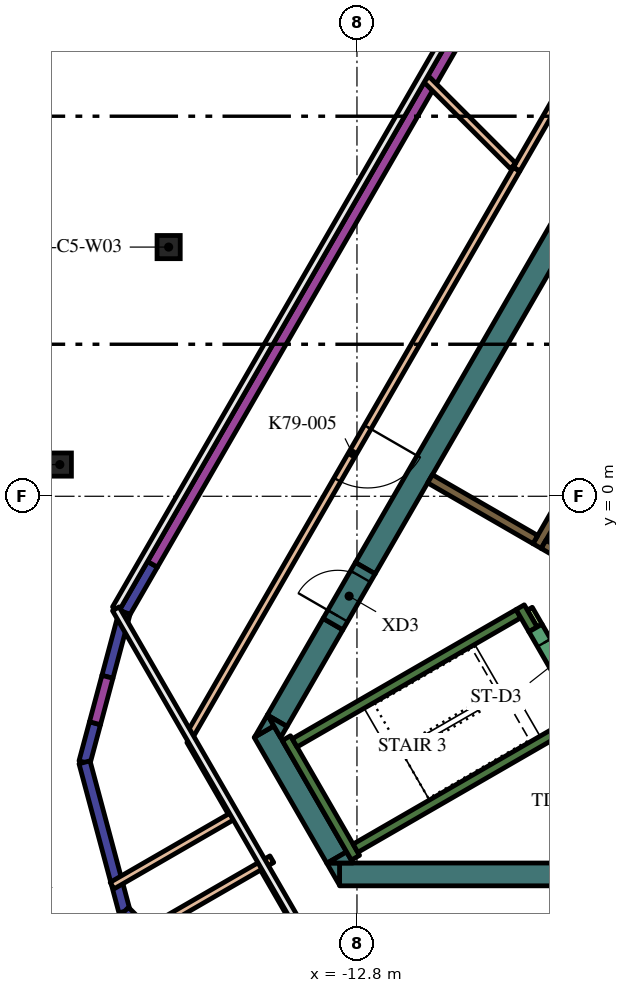
"""IFC4 building model, lengths in metres.
Left out: names, types, materials, properties, quantities, classifications, styles, units other than length and angle.
Written with IfcOpenShell. Run it as: python <this file> out.ifc"""

import sys

from ifc_helpers import new_model, si_unit, direction, frame, frame_2d, origin, origin_2d, place, context, subcontext, project, spatial, polyline, rectangle, hollow_circle, outline, extrude, element, fill, save


model = new_model("IFC4")
c1 = context("Model", 3, precision=1e-05, world=origin(), true_north=direction((0.0, 1.0)))
c2 = subcontext(c1, "Body", "Model", "MODEL_VIEW")
j1 = project(units=[si_unit("LENGTHUNIT", "METRE"), si_unit("PLANEANGLEUNIT", "RADIAN")], contexts=[c1])
p1 = place(None, origin())
s1 = spatial("IfcSite", under=j1, at=p1, CompositionType="ELEMENT")
p2 = place(p1, origin())
s2 = spatial("IfcBuilding", under=s1, at=p2, CompositionType="ELEMENT")
p3 = place(p2, frame((0.0, 0.0, 340.2)))
s3 = spatial("IfcBuildingStorey", under=s2, at=p3, CompositionType="ELEMENT", Elevation=340.2)
for number, where, z_axis, x_axis in (
    (1, (-17.756, 6.557, 0.0), (0.0, 0.0, 1.0), (1.0, 0.0, 0.0)),
    (2, (-20.619, 0.834, 0.0), (0.0, 0.0, 1.0), (1.0, 0.0, 0.0)),
):
    element("IfcColumn", number, at=place(p3, frame(where, z_axis=z_axis, x_axis=x_axis)), inside=s3, PredefinedType="COLUMN", context=c2, shape_type="SweptSolid", body=[
        extrude(hollow_circle(Radius=0.305, WallThickness=0.025, at=origin_2d()), origin(), (0.0, 0.0, 1.0), 4.2),
    ])
p4 = place(p3, frame((8.904, -9.95, 0.0), z_axis=(0.0, 0.0, 1.0), x_axis=(-1.0, 0.0, 0.0)))
e3 = element("IfcWall", 3, at=p4, inside=s3, PredefinedType="SOLIDWALL", context=c2, shape_type="SweptSolid", body=[
    extrude(rectangle(XDim=22.161, YDim=0.6, at=frame_2d((11.081, 0.0))), origin(), (0.0, 0.0, 1.0), 4.2),
])
p5 = place(p3, origin())
e4 = element("IfcWall", 4, at=p5, inside=s3, PredefinedType="SOLIDWALL", context=c2, shape_type="SweptSolid", body=[
    extrude(outline(polyline([(-13.597, -9.65), (-13.259, -9.65), (-13.259, -10.236), (-13.597, -9.65)])), origin(), (0.0, 0.0, 1.0), 4.2),
])
p6 = place(p3, frame((-13.333, -9.506, 0.0), z_axis=(0.0, 0.0, 1.0), x_axis=(-0.500019073792, 0.866014391245, 0.0)))
e5 = element("IfcWall", 5, at=p6, inside=s3, PredefinedType="SOLIDWALL", context=c2, shape_type="SweptSolid", body=[
    extrude(rectangle(XDim=3.823, YDim=0.6, at=frame_2d((1.912, 0.0))), origin(), (0.0, 0.0, 1.0), 4.2),
])
e6 = element("IfcWall", 6, at=p5, inside=s3, PredefinedType="SOLIDWALL", context=c2, shape_type="SweptSolid", body=[
    extrude(outline(polyline([(-14.987, -6.043), (-15.493, -6.335), (-15.156, -5.75), (-14.987, -6.043)])), origin(), (0.0, 0.0, 1.0), 4.2),
])
e7 = element("IfcWall", 7, at=p5, inside=s3, PredefinedType="SOLIDWALL", context=c2, shape_type="SweptSolid", body=[
    extrude(outline(polyline([(-12.904, -9.65), (-13.58, -9.65), (-13.073, -9.357), (-12.904, -9.65)])), origin(), (0.0, 0.0, 1.0), 4.2),
])
p7 = place(p3, frame((-13.432, -3.364, 0.0), z_axis=(0.0, 0.0, 1.0), x_axis=(-0.499960127962, -0.866048422692, 0.0)))
e8 = element("IfcWall", 8, at=p7, inside=s3, PredefinedType="SOLIDWALL", context=c2, shape_type="SweptSolid", body=[
    extrude(rectangle(XDim=2.934, YDim=0.6, at=frame_2d((1.467, 0.0))), origin(), (0.0, 0.0, 1.0), 4.2),
])
e9 = element("IfcWall", 9, at=p5, inside=s3, PredefinedType="SOLIDWALL", context=c2, shape_type="SweptSolid", body=[
    extrude(outline(polyline([(-14.809, -6.35), (-15.147, -5.764), (-14.64, -6.057), (-14.809, -6.35)])), origin(), (0.0, 0.0, 1.0), 4.2),
])
p8 = place(p3, frame((-4.652, 11.842, 0.0), z_axis=(0.0, 0.0, 1.0), x_axis=(-0.500003640647, -0.866023301845, 0.0)))
e10 = element("IfcWall", 10, at=p8, inside=s3, PredefinedType="SOLIDWALL", context=c2, shape_type="SweptSolid", body=[
    extrude(rectangle(XDim=15.858, YDim=0.6, at=frame_2d((7.929, 0.0))), origin(), (0.0, 0.0, 1.0), 4.2),
])
p9 = place(p3, frame((-12.84, -9.511, 0.0), z_axis=(0.0, 0.0, 1.0), x_axis=(-0.499997733992, 0.866026712061, 0.0)))
e11 = element("IfcWall", 11, at=p9, inside=s3, PredefinedType="SOLIDWALL", context=c2, shape_type="SweptSolid", body=[
    extrude(rectangle(XDim=3.634, YDim=0.25, at=frame_2d((1.817, 0.0))), origin(), (0.0, 0.0, 1.0), 4.2),
])
p10 = place(p3, frame((-14.44, -6.49, 0.0), z_axis=(0.0, 0.0, 1.0), x_axis=(0.866022966069, 0.500004222222, 0.0)))
e12 = element("IfcWall", 12, at=p10, inside=s3, PredefinedType="SOLIDWALL", context=c2, shape_type="SweptSolid", body=[
    extrude(rectangle(XDim=6.8, YDim=0.25, at=frame_2d((3.4, 0.0))), origin(), (0.0, 0.0, 1.0), 4.2),
])
p11 = place(p3, frame((-8.168, -3.503, 0.0), z_axis=(0.0, 0.0, 1.0), x_axis=(-0.499952099219, 0.866053057547, 0.0)))
e13 = element("IfcWall", 13, at=p11, inside=s3, PredefinedType="SOLIDWALL", context=c2, shape_type="SweptSolid", body=[
    extrude(rectangle(XDim=0.675, YDim=0.25, at=frame_2d((0.337, 0.0))), origin(), (0.0, 0.0, 1.0), 4.2),
])
p12 = place(p3, frame((-12.84, -9.261, 0.0), z_axis=(0.0, 0.0, 1.0), x_axis=(0.866016039709, 0.500016218704, 0.0)))
e14 = element("IfcWall", 14, at=p12, inside=s3, PredefinedType="SOLIDWALL", context=c2, shape_type="SweptSolid", body=[
    extrude(rectangle(XDim=7.05, YDim=0.25, at=frame_2d((3.525, 0.0))), origin(), (0.0, 0.0, 1.0), 4.2),
])
p13 = place(p3, frame((-8.06, -1.311, 0.0), z_axis=(0.0, 0.0, 1.0), x_axis=(0.50000273126, 0.866023826885, 0.0)))
e15 = element("IfcWall", 15, at=p13, inside=s3, PredefinedType="SOLIDWALL", context=c2, shape_type="SweptSolid", body=[
    extrude(rectangle(XDim=10.33, YDim=0.25, at=frame_2d((5.165, 0.0))), origin(), (0.0, 0.0, 1.0), 4.2),
])
p14 = place(p3, frame((-7.889, -1.265, 0.0), z_axis=(0.0, 0.0, 1.0), x_axis=(0.865986741702, -0.500066958712, 0.0)))
e16 = element("IfcWall", 16, at=p14, inside=s3, PredefinedType="SOLIDWALL", context=c2, shape_type="SweptSolid", body=[
    extrude(rectangle(XDim=1.738, YDim=0.25, at=frame_2d((0.869, 0.0))), origin(), (0.0, 0.0, 1.0), 4.2),
])
p15 = place(p3, frame((-8.106, -1.14, 0.0), z_axis=(0.0, 0.0, 1.0), x_axis=(-0.866008981251, 0.500028443584, 0.0)))
e17 = element("IfcWall", 17, at=p15, inside=s3, PredefinedType="SOLIDWALL", context=c2, shape_type="SweptSolid", body=[
    extrude(rectangle(XDim=3.2, YDim=0.25, at=frame_2d((1.6, 0.0))), origin(), (0.0, 0.0, 1.0), 4.2),
])
p16 = place(p3, frame((-8.252, -2.958, 0.0), z_axis=(0.0, 0.0, 1.0), x_axis=(0.500174715838, -0.865924508047, 0.0)))
e18 = element("IfcWall", 18, at=p16, inside=s3, PredefinedType="PARTITIONING", context=c2, shape_type="SweptSolid", body=[
    extrude(rectangle(XDim=0.514, YDim=0.15, at=frame_2d((0.257, 0.0))), origin(), (0.0, 0.0, 1.0), 3.45),
])
p17 = place(p3, frame((-8.103, -3.466, 0.0), z_axis=(0.0, 0.0, 1.0), x_axis=(0.500078061341, -0.865980330357, 0.0)))
e19 = element("IfcWall", 19, at=p17, inside=s3, PredefinedType="SOLIDWALL", context=c2, shape_type="SweptSolid", body=[
    extrude(rectangle(XDim=2.1, YDim=0.4, at=frame_2d((1.05, 0.0))), origin(), (0.0, 0.0, 1.0), 4.2),
])
p18 = place(p17, frame((0.45, 0.0, 0.0)))
e20 = element("IfcOpeningElement", 20, at=p18, cuts=e19, PredefinedType="OPENING", context=c2, shape_type="SweptSolid", body=[
    extrude(rectangle(XDim=1.2, YDim=2.1, at=frame_2d((0.6, 1.05))), frame((0.0, 0.21, 0.0), z_axis=(0.0, -1.0, 0.0), x_axis=(1.0, 0.0, 0.0)), (0.0, 0.0, 1.0), 0.42),
])
p19 = place(p3, frame((-13.432, -3.364, 0.0), z_axis=(0.0, 0.0, 1.0), x_axis=(0.500000056704, 0.866025371046, 0.0)))
e21 = element("IfcWall", 21, at=p19, inside=s3, PredefinedType="SOLIDWALL", context=c2, shape_type="SweptSolid", body=[
    extrude(rectangle(XDim=1.7, YDim=0.6, at=frame_2d((0.85, 0.0))), origin(), (0.0, 0.0, 1.0), 4.2),
])
p20 = place(p19, frame((0.25, 0.0, 0.0)))
e22 = element("IfcOpeningElement", 22, at=p20, cuts=e21, PredefinedType="OPENING", context=c2, shape_type="SweptSolid", body=[
    extrude(rectangle(XDim=1.2, YDim=2.1, at=frame_2d((0.6, 1.05))), frame((0.0, 0.31, 0.0), z_axis=(0.0, -1.0, 0.0), x_axis=(1.0, 0.0, 0.0)), (0.0, 0.0, 1.0), 0.62),
])
p21 = place(p3, frame((-8.602, 8.602, 0.0), z_axis=(0.0, 0.0, 1.0), x_axis=(-0.499992973356, -0.866029460581, 0.0)))
e23 = element("IfcWall", 23, at=p21, inside=s3, PredefinedType="PARTITIONING", context=c2, shape_type="SweptSolid", body=[
    extrude(rectangle(XDim=17.265, YDim=0.2, at=frame_2d((8.632, 0.0))), origin(), (0.0, 0.0, 1.0), 3.45),
])
p22 = place(p21, frame((7.833, 0.0, 0.0)))
e24 = element("IfcOpeningElement", 24, at=p22, cuts=e23, PredefinedType="OPENING", context=c2, shape_type="SweptSolid", body=[
    extrude(rectangle(XDim=1.6, YDim=2.1, at=frame_2d((0.8, 1.05))), frame((0.0, 0.11, 0.0), z_axis=(0.0, -1.0, 0.0), x_axis=(1.0, 0.0, 0.0)), (0.0, 0.0, 1.0), 0.22),
])
p23 = place(p3, frame((-3.118, 18.1, 0.0), z_axis=(0.0, 0.0, 1.0), x_axis=(-0.499996953601, -0.866027162616, 0.0)))
e25 = element("IfcWall", 25, at=p23, inside=s3, PredefinedType="PARTITIONING", context=c2, shape_type="SweptSolid", body=[
    extrude(rectangle(XDim=10.958, YDim=0.2, at=frame_2d((5.479, 0.0))), origin(), (0.0, 0.0, 1.0), 3.45),
])
p24 = place(p23, frame((4.879, 0.0, 0.0)))
e26 = element("IfcOpeningElement", 26, at=p24, cuts=e25, PredefinedType="OPENING", context=c2, shape_type="SweptSolid", body=[
    extrude(rectangle(XDim=1.2, YDim=2.1, at=frame_2d((0.6, 1.05))), frame((0.0, 0.11, 0.0), z_axis=(0.0, -1.0, 0.0), x_axis=(1.0, 0.0, 0.0)), (0.0, 0.0, 1.0), 0.22),
])
p25 = place(p3, frame((-19.244, -10.245, 0.0), z_axis=(0.0, 0.0, 1.0), x_axis=(0.866026863259, 0.499997472108, 0.0)))
e27 = element("IfcWall", 27, at=p25, inside=s3, PredefinedType="PARTITIONING", context=c2, shape_type="SweptSolid", body=[
    extrude(rectangle(XDim=3.688, YDim=0.2, at=frame_2d((1.844, 0.0))), origin(), (0.0, 0.0, 1.0), 3.45),
])
p26 = place(p3, frame((-15.04, -9.55, 0.0), z_axis=(0.0, 0.0, 1.0), x_axis=(-0.866034723298, -0.499983857782, 0.0)))
e28 = element("IfcWall", 28, at=p26, inside=s3, PredefinedType="PARTITIONING", context=c2, shape_type="SweptSolid", body=[
    extrude(rectangle(XDim=3.989, YDim=0.2, at=frame_2d((1.994, 0.0))), origin(), (0.0, 0.0, 1.0), 3.45),
])
p27 = place(p3, frame((-8.694, 8.694, 0.0), z_axis=(0.0, 0.0, 1.0), x_axis=(-0.707106781187, 0.707106781187, 0.0)))
e29 = element("IfcWall", 29, at=p27, inside=s3, PredefinedType="PARTITIONING", context=c2, shape_type="SweptSolid", body=[
    extrude(rectangle(XDim=3.224, YDim=0.2, at=frame_2d((1.612, 0.0))), origin(), (0.0, 0.0, 1.0), 3.45),
])
for number, where, z_axis, x_axis in (
    (30, (-16.1, -8.314, 0.0), (0.0, 0.0, 1.0), (-0.5, 0.866, 0.0)),
    (31, (-14.161, -11.672, 0.0), (0.0, 0.0, 1.0), (-0.5, 0.866, 0.0)),
):
    element("IfcWall", number, at=place(p3, frame(where, z_axis=z_axis, x_axis=x_axis)), inside=s3, PredefinedType="PARTITIONING", context=c2, shape_type="SweptSolid", body=[
        extrude(rectangle(XDim=2.178, YDim=0.2, at=frame_2d((1.089, 0.0))), origin(), (0.0, 0.0, 1.0), 3.45),
    ])
p28 = place(p3, frame((-7.54, 16.64, 0.0), z_axis=(0.0, 0.0, 1.0), x_axis=(-0.500002158106, -0.866024157798, 0.0)))
e32 = element("IfcWall", 32, at=p28, inside=s3, PredefinedType="SOLIDWALL", context=c2, shape_type="SweptSolid", body=[
    extrude(rectangle(XDim=21.282, YDim=0.3, at=frame_2d((10.641, 0.0))), origin(), (0.0, 0.0, 1.0), 3.45),
])
p29 = place(p3, frame((-18.181, -1.79, 0.0), z_axis=(0.0, 0.0, 1.0), x_axis=(-0.500049712553, -0.865996700326, 0.0)))
e33 = element("IfcWall", 33, at=p29, inside=s3, PredefinedType="SOLIDWALL", context=c2, shape_type="SweptSolid", body=[
    extrude(rectangle(XDim=1.464, YDim=0.3, at=frame_2d((0.732, 0.0))), origin(), (0.0, 0.0, 1.0), 3.95),
])
p30 = place(p3, frame((-18.913, -3.058, 0.0), z_axis=(0.0, 0.0, 1.0), x_axis=(-0.258824282894, -0.965924422812, 0.0)))
e34 = element("IfcWall", 34, at=p30, inside=s3, PredefinedType="SOLIDWALL", context=c2, shape_type="SweptSolid", body=[
    extrude(rectangle(XDim=1.753, YDim=0.3, at=frame_2d((0.876, 0.0))), origin(), (0.0, 0.0, 1.0), 3.95),
])
p31 = place(p3, frame((-19.366, -4.751, 0.0), z_axis=(0.0, 0.0, 1.0), x_axis=(-0.258816538161, -0.965926498018, 0.0)))
e35 = element("IfcWall", 35, at=p31, inside=s3, PredefinedType="SOLIDWALL", context=c2, shape_type="SweptSolid", body=[
    extrude(rectangle(XDim=1.264, YDim=0.3, at=frame_2d((0.632, 0.0))), origin(), (0.0, 0.0, 1.0), 3.45),
])
p32 = place(p3, frame((-19.694, -5.972, 0.0), z_axis=(0.0, 0.0, 1.0), x_axis=(-0.258690231517, -0.96596033258, 0.0)))
e36 = element("IfcWall", 36, at=p32, inside=s3, PredefinedType="SOLIDWALL", context=c2, shape_type="SweptSolid", body=[
    extrude(rectangle(XDim=1.064, YDim=0.3, at=frame_2d((0.532, 0.0))), origin(), (0.0, 0.0, 1.0), 3.95),
])
for number, where, z_axis, x_axis in (
    (37, (-19.969, -7.0, 0.0), (0.0, 0.0, 1.0), (0.259, -0.966, 0.0)),
    (38, (-18.918, -10.922, 0.0), (0.0, 0.0, 1.0), (0.707, -0.707, 0.0)),
):
    element("IfcWall", number, at=place(p3, frame(where, z_axis=z_axis, x_axis=x_axis)), inside=s3, PredefinedType="SOLIDWALL", context=c2, shape_type="SweptSolid", body=[
        extrude(rectangle(XDim=4.061, YDim=0.3, at=frame_2d((2.03, 0.0))), origin(), (0.0, 0.0, 1.0), 3.95),
    ])
p33 = place(p18, origin())
e39 = element("IfcDoor", 39, at=p33, inside=s3, OperationType="SINGLE_SWING_LEFT", PredefinedType="DOOR", context=c2, shape_type="SweptSolid", body=[
    extrude(rectangle(XDim=1.2, YDim=2.1, at=frame_2d((0.6, 1.05))), frame((0.0, 0.025, 0.0), z_axis=(0.0, -1.0, 0.0), x_axis=(1.0, 0.0, 0.0)), (0.0, 0.0, 1.0), 0.05),
])
fill(e20, e39)
p34 = place(p20, origin())
e40 = element("IfcDoor", 40, at=p34, inside=s3, OperationType="SINGLE_SWING_LEFT", PredefinedType="DOOR", context=c2, shape_type="SweptSolid", body=[
    extrude(rectangle(XDim=1.2, YDim=2.1, at=frame_2d((0.6, 1.05))), frame((0.0, 0.025, 0.0), z_axis=(0.0, -1.0, 0.0), x_axis=(1.0, 0.0, 0.0)), (0.0, 0.0, 1.0), 0.05),
])
fill(e22, e40)
p35 = place(p22, origin())
e41 = element("IfcDoor", 41, at=p35, inside=s3, OperationType="DOUBLE_DOOR_SINGLE_SWING", PredefinedType="DOOR", context=c2, shape_type="SweptSolid", body=[
    extrude(rectangle(XDim=1.6, YDim=2.1, at=frame_2d((0.8, 1.05))), frame((0.0, 0.025, 0.0), z_axis=(0.0, -1.0, 0.0), x_axis=(1.0, 0.0, 0.0)), (0.0, 0.0, 1.0), 0.05),
])
fill(e24, e41)
save(model, sys.argv[1])
